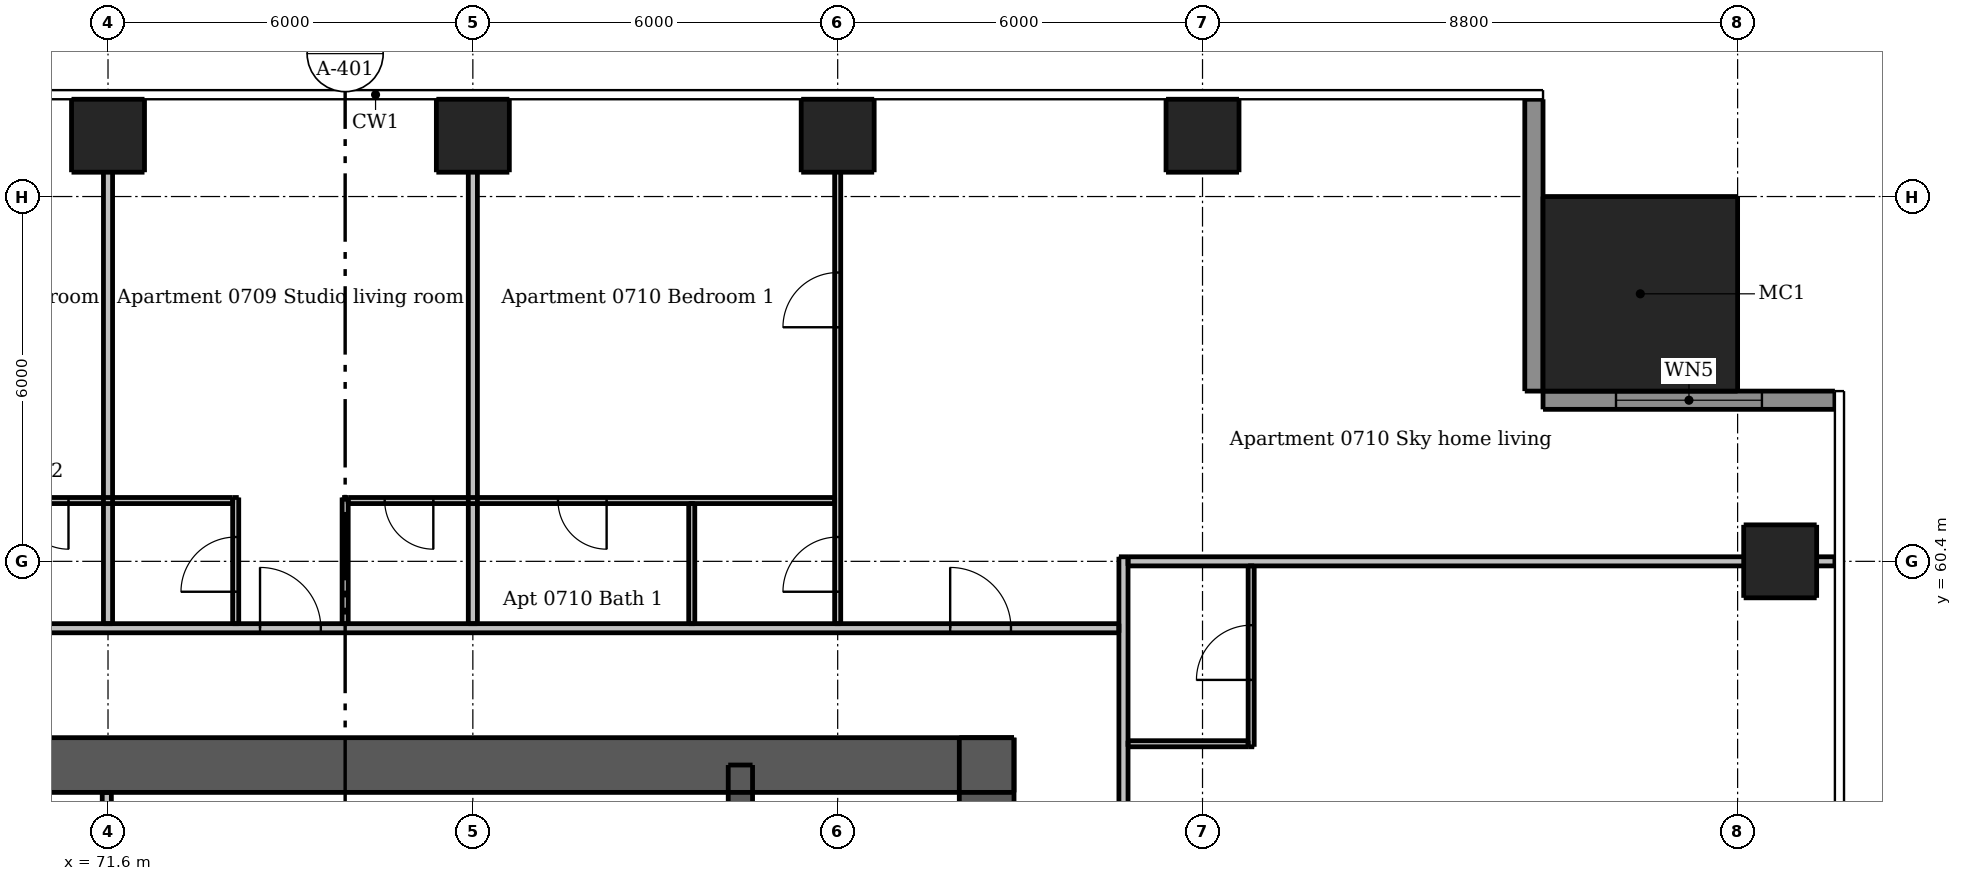
"""IFC4 building model, lengths in metres.
Left out: names, types, materials, properties, quantities, classifications, styles, units other than length and angle.
Written with IfcOpenShell. Run it as: python <this file> out.ifc"""

import sys

from ifc_helpers import new_model, si_unit, direction, frame, frame_2d, origin, origin_2d, place, context, subcontext, project, spatial, rectangle, extrude, element, fill, save


model = new_model("IFC4")
c1 = context("Model", 3, precision=1e-05, world=origin(), true_north=direction((0.0, 1.0)))
c2 = subcontext(c1, "Body", "Model", "MODEL_VIEW")
j1 = project(units=[si_unit("LENGTHUNIT", "METRE"), si_unit("PLANEANGLEUNIT", "RADIAN")], contexts=[c1])
p1 = place(None, origin())
s1 = spatial("IfcSite", under=j1, at=p1, CompositionType="ELEMENT")
p2 = place(p1, origin())
s2 = spatial("IfcBuilding", under=s1, at=p2, CompositionType="ELEMENT")
p3 = place(p2, frame((0.0, 0.0, 30.1)))
s3 = spatial("IfcBuildingStorey", under=s2, at=p3, CompositionType="ELEMENT", Elevation=30.1)
p4 = place(p3, frame((62.5, 57.05, 0.0), z_axis=(0.0, 0.0, 1.0), x_axis=(1.0, 0.0, 0.0)))
e1 = element("IfcWall", 1, at=p4, inside=s3, PredefinedType="SHEAR", context=c2, shape_type="SweptSolid", body=[
    extrude(rectangle(XDim=24.0, YDim=0.9, at=frame_2d((12.0, 0.0))), origin(), (0.0, 0.0, 1.0), 3.05),
])
p5 = place(p4, frame((20.85, 0.0, 0.0)))
e2 = element("IfcOpeningElement", 2, at=p5, cuts=e1, PredefinedType="OPENING", context=c2, shape_type="SweptSolid", body=[
    extrude(rectangle(XDim=1.1, YDim=2.1, at=frame_2d((0.55, 1.05))), frame((0.0, 0.46, 0.0), z_axis=(0.0, -1.0, 0.0), x_axis=(1.0, 0.0, 0.0)), (0.0, 0.0, 1.0), 0.92),
])
p6 = place(p4, frame((2.05, 0.0, 0.0)))
e3 = element("IfcOpeningElement", 3, at=p6, cuts=e1, PredefinedType="OPENING", context=c2, shape_type="SweptSolid", body=[
    extrude(rectangle(XDim=1.1, YDim=2.1, at=frame_2d((0.55, 1.05))), frame((0.0, 0.46, 0.0), z_axis=(0.0, -1.0, 0.0), x_axis=(1.0, 0.0, 0.0)), (0.0, 0.0, 1.0), 0.92),
])
p7 = place(p4, frame((6.44, 0.0, 0.0)))
e4 = element("IfcOpeningElement", 4, at=p7, cuts=e1, PredefinedType="OPENING", context=c2, shape_type="SweptSolid", body=[
    extrude(rectangle(XDim=0.9, YDim=2.1, at=frame_2d((0.45, 1.05))), frame((0.0, 0.46, 0.0), z_axis=(0.0, -1.0, 0.0), x_axis=(1.0, 0.0, 0.0)), (0.0, 0.0, 1.0), 0.92),
])
p8 = place(p4, frame((13.74, 0.0, 0.0)))
e5 = element("IfcOpeningElement", 5, at=p8, cuts=e1, PredefinedType="OPENING", context=c2, shape_type="SweptSolid", body=[
    extrude(rectangle(XDim=0.9, YDim=2.1, at=frame_2d((0.45, 1.05))), frame((0.0, 0.46, 0.0), z_axis=(0.0, -1.0, 0.0), x_axis=(1.0, 0.0, 0.0)), (0.0, 0.0, 1.0), 0.92),
])
p9 = place(p3, frame((86.05, 33.5, 0.0), z_axis=(0.0, 0.0, 1.0), x_axis=(0.0, 1.0, 0.0)))
e6 = element("IfcWall", 6, at=p9, inside=s3, PredefinedType="SHEAR", context=c2, shape_type="SweptSolid", body=[
    extrude(rectangle(XDim=24.0, YDim=0.9, at=frame_2d((12.0, 0.0))), origin(), (0.0, 0.0, 1.0), 3.05),
])
p10 = place(p9, frame((11.2, 0.0, 0.0)))
e7 = element("IfcOpeningElement", 7, at=p10, cuts=e6, PredefinedType="OPENING", context=c2, shape_type="SweptSolid", body=[
    extrude(rectangle(XDim=1.6, YDim=2.1, at=frame_2d((0.8, 1.05))), frame((0.0, 0.46, 0.0), z_axis=(0.0, -1.0, 0.0), x_axis=(1.0, 0.0, 0.0)), (0.0, 0.0, 1.0), 0.92),
])
p11 = place(p3, frame((82.0, 47.1, 0.0), z_axis=(0.0, 0.0, 1.0), x_axis=(0.0, 1.0, 0.0)))
e8 = element("IfcWall", 8, at=p11, inside=s3, PredefinedType="SHEAR", context=c2, shape_type="SweptSolid", body=[
    extrude(rectangle(XDim=9.95, YDim=0.4, at=frame_2d((4.975, 0.0))), origin(), (0.0, 0.0, 1.0), 3.05),
])
for number, where, z_axis, x_axis in (
    (9, (99.1, 60.4, 0.0), (0.0, 0.0, 1.0), (1.0, 0.0, 0.0)),
    (10, (71.6, 67.4, 0.0), (0.0, 0.0, 1.0), (1.0, 0.0, 0.0)),
    (11, (77.6, 67.4, 0.0), (0.0, 0.0, 1.0), (1.0, 0.0, 0.0)),
    (12, (83.6, 67.4, 0.0), (0.0, 0.0, 1.0), (1.0, 0.0, 0.0)),
    (13, (89.6, 67.4, 0.0), (0.0, 0.0, 1.0), (1.0, 0.0, 0.0)),
):
    element("IfcColumn", number, at=place(p3, frame(where, z_axis=z_axis, x_axis=x_axis)), inside=s3, PredefinedType="COLUMN", context=c2, shape_type="SweptSolid", body=[
        extrude(rectangle(XDim=1.2, YDim=1.2, at=origin_2d()), origin(), (0.0, 0.0, 1.0), 3.05),
    ])
p12 = place(p3, frame((96.8, 64.8, 0.0), z_axis=(0.0, 0.0, 1.0), x_axis=(1.0, 0.0, 0.0)))
e14 = element("IfcColumn", 14, at=p12, inside=s3, PredefinedType="COLUMN", context=c2, shape_type="SweptSolid", body=[
    extrude(rectangle(XDim=3.2, YDim=3.2, at=origin_2d()), origin(), (0.0, 0.0, 1.0), 3.3),
])
p13 = place(p3, frame((100.0, 63.05, 0.0), z_axis=(0.0, 0.0, 1.0), x_axis=(-1.0, 0.0, 0.0)))
e15 = element("IfcWall", 15, at=p13, inside=s3, PredefinedType="SOLIDWALL", context=c2, shape_type="SweptSolid", body=[
    extrude(rectangle(XDim=4.8, YDim=0.3, at=frame_2d((2.4, 0.0))), origin(), (0.0, 0.0, 1.0), 3.05),
])
p14 = place(p13, frame((1.2, 0.0, 0.15)))
e16 = element("IfcOpeningElement", 16, at=p14, cuts=e15, PredefinedType="OPENING", context=c2, shape_type="SweptSolid", body=[
    extrude(rectangle(XDim=2.4, YDim=2.1, at=frame_2d((1.2, 1.05))), frame((0.0, 0.16, 0.0), z_axis=(0.0, -1.0, 0.0), x_axis=(1.0, 0.0, 0.0)), (0.0, 0.0, 1.0), 0.32),
])
p15 = place(p3, frame((95.05, 63.2, 0.0), z_axis=(0.0, 0.0, 1.0), x_axis=(0.0, 1.0, 0.0)))
e17 = element("IfcWall", 17, at=p15, inside=s3, PredefinedType="SOLIDWALL", context=c2, shape_type="SweptSolid", body=[
    extrude(rectangle(XDim=4.8, YDim=0.3, at=frame_2d((2.4, 0.0))), origin(), (0.0, 0.0, 1.0), 3.05),
])
p16 = place(p3, frame((71.58, 50.2, 0.0), z_axis=(0.0, 0.0, 1.0), x_axis=(0.0, 1.0, 0.0)))
e18 = element("IfcWall", 18, at=p16, inside=s3, PredefinedType="PLUMBINGWALL", context=c2, shape_type="SweptSolid", body=[
    extrude(rectangle(XDim=6.4, YDim=0.15, at=frame_2d((3.2, 0.0))), origin(), (0.0, 0.0, 1.0), 3.05),
])
p17 = place(p3, frame((73.7, 59.375, 0.0), z_axis=(0.0, 0.0, 1.0), x_axis=(0.0, 1.0, 0.0)))
e19 = element("IfcWall", 19, at=p17, inside=s3, PredefinedType="PARTITIONING", context=c2, shape_type="SweptSolid", body=[
    extrude(rectangle(XDim=2.075, YDim=0.1, at=frame_2d((1.038, 0.0))), origin(), (0.0, 0.0, 1.0), 3.05),
])
p18 = place(p17, frame((0.525, 0.0, 0.0)))
e20 = element("IfcOpeningElement", 20, at=p18, cuts=e19, PredefinedType="OPENING", context=c2, shape_type="SweptSolid", body=[
    extrude(rectangle(XDim=0.9, YDim=2.1, at=frame_2d((0.45, 1.05))), frame((0.0, 0.06, 0.0), z_axis=(0.0, -1.0, 0.0), x_axis=(1.0, 0.0, 0.0)), (0.0, 0.0, 1.0), 0.12),
])
p19 = place(p3, frame((75.5, 59.375, 0.0), z_axis=(0.0, 0.0, 1.0), x_axis=(0.0, 1.0, 0.0)))
e21 = element("IfcWall", 21, at=p19, inside=s3, PredefinedType="PARTITIONING", context=c2, shape_type="SweptSolid", body=[
    extrude(rectangle(XDim=2.075, YDim=0.1, at=frame_2d((1.038, 0.0))), origin(), (0.0, 0.0, 1.0), 3.05),
])
p20 = place(p3, frame((81.2, 59.375, 0.0), z_axis=(0.0, 0.0, 1.0), x_axis=(0.0, 1.0, 0.0)))
e22 = element("IfcWall", 22, at=p20, inside=s3, PredefinedType="PARTITIONING", context=c2, shape_type="SweptSolid", body=[
    extrude(rectangle(XDim=1.975, YDim=0.1, at=frame_2d((0.988, 0.0))), origin(), (0.0, 0.0, 1.0), 3.05),
])
p21 = place(p3, frame((83.6, 59.375, 0.0), z_axis=(0.0, 0.0, 1.0), x_axis=(0.0, 1.0, 0.0)))
e23 = element("IfcWall", 23, at=p21, inside=s3, PredefinedType="PARTITIONING", context=c2, shape_type="SweptSolid", body=[
    extrude(rectangle(XDim=8.625, YDim=0.1, at=frame_2d((4.312, 0.0))), origin(), (0.0, 0.0, 1.0), 2.516),
])
p22 = place(p21, frame((0.525, 0.0, 0.0)))
e24 = element("IfcOpeningElement", 24, at=p22, cuts=e23, PredefinedType="OPENING", context=c2, shape_type="SweptSolid", body=[
    extrude(rectangle(XDim=0.9, YDim=2.1, at=frame_2d((0.45, 1.05))), frame((0.0, 0.06, 0.0), z_axis=(0.0, -1.0, 0.0), x_axis=(1.0, 0.0, 0.0)), (0.0, 0.0, 1.0), 0.12),
])
p23 = place(p21, frame((4.875, 0.0, 0.0)))
e25 = element("IfcOpeningElement", 25, at=p23, cuts=e23, PredefinedType="OPENING", context=c2, shape_type="SweptSolid", body=[
    extrude(rectangle(XDim=0.9, YDim=2.1, at=frame_2d((0.45, 1.05))), frame((0.0, 0.06, 0.0), z_axis=(0.0, -1.0, 0.0), x_axis=(1.0, 0.0, 0.0)), (0.0, 0.0, 1.0), 0.12),
])
p24 = place(p3, frame((90.4, 57.35, 0.0), z_axis=(0.0, 0.0, 1.0), x_axis=(0.0, 1.0, 0.0)))
e26 = element("IfcWall", 26, at=p24, inside=s3, PredefinedType="PARTITIONING", context=c2, shape_type="SweptSolid", body=[
    extrude(rectangle(XDim=2.975, YDim=0.1, at=frame_2d((1.487, 0.0))), origin(), (0.0, 0.0, 1.0), 3.05),
])
p25 = place(p24, frame((1.1, 0.0, 0.0)))
e27 = element("IfcOpeningElement", 27, at=p25, cuts=e26, PredefinedType="OPENING", context=c2, shape_type="SweptSolid", body=[
    extrude(rectangle(XDim=0.9, YDim=2.1, at=frame_2d((0.45, 1.05))), frame((0.0, 0.06, 0.0), z_axis=(0.0, -1.0, 0.0), x_axis=(1.0, 0.0, 0.0)), (0.0, 0.0, 1.0), 0.12),
])
p26 = place(p3, frame((73.65, 61.4, 0.0), z_axis=(0.0, 0.0, 1.0), x_axis=(-1.0, 0.0, 0.0)))
e28 = element("IfcWall", 28, at=p26, inside=s3, PredefinedType="PARTITIONING", context=c2, shape_type="SweptSolid", body=[
    extrude(rectangle(XDim=4.1, YDim=0.1, at=frame_2d((2.05, 0.0))), origin(), (0.0, 0.0, 1.0), 3.05),
])
p27 = place(p26, frame((2.7, 0.0, 0.0)))
e29 = element("IfcOpeningElement", 29, at=p27, cuts=e28, PredefinedType="OPENING", context=c2, shape_type="SweptSolid", body=[
    extrude(rectangle(XDim=0.8, YDim=2.1, at=frame_2d((0.4, 1.05))), frame((0.0, 0.06, 0.0), z_axis=(0.0, -1.0, 0.0), x_axis=(1.0, 0.0, 0.0)), (0.0, 0.0, 1.0), 0.12),
])
p28 = place(p3, frame((83.55, 61.4, 0.0), z_axis=(0.0, 0.0, 1.0), x_axis=(-1.0, 0.0, 0.0)))
e30 = element("IfcWall", 30, at=p28, inside=s3, PredefinedType="PARTITIONING", context=c2, shape_type="SweptSolid", body=[
    extrude(rectangle(XDim=8.0, YDim=0.1, at=frame_2d((4.0, 0.0))), origin(), (0.0, 0.0, 1.0), 3.05),
])
p29 = place(p28, frame((6.6, 0.0, 0.0)))
e31 = element("IfcOpeningElement", 31, at=p29, cuts=e30, PredefinedType="OPENING", context=c2, shape_type="SweptSolid", body=[
    extrude(rectangle(XDim=0.8, YDim=2.1, at=frame_2d((0.4, 1.05))), frame((0.0, 0.06, 0.0), z_axis=(0.0, -1.0, 0.0), x_axis=(1.0, 0.0, 0.0)), (0.0, 0.0, 1.0), 0.12),
])
p30 = place(p28, frame((3.75, 0.0, 0.0)))
e32 = element("IfcOpeningElement", 32, at=p30, cuts=e30, PredefinedType="OPENING", context=c2, shape_type="SweptSolid", body=[
    extrude(rectangle(XDim=0.8, YDim=2.1, at=frame_2d((0.4, 1.05))), frame((0.0, 0.06, 0.0), z_axis=(0.0, -1.0, 0.0), x_axis=(1.0, 0.0, 0.0)), (0.0, 0.0, 1.0), 0.12),
])
p31 = place(p3, frame((88.375, 57.4, 0.0), z_axis=(0.0, 0.0, 1.0), x_axis=(1.0, 0.0, 0.0)))
e33 = element("IfcWall", 33, at=p31, inside=s3, PredefinedType="PARTITIONING", context=c2, shape_type="SweptSolid", body=[
    extrude(rectangle(XDim=1.975, YDim=0.1, at=frame_2d((0.988, 0.0))), origin(), (0.0, 0.0, 1.0), 3.05),
])
for number, where, z_axis, x_axis in (
    (34, (71.6, 59.375, 0.0), (0.0, 0.0, 1.0), (0.0, 1.0, 0.0)),
    (35, (77.6, 59.375, 0.0), (0.0, 0.0, 1.0), (0.0, 1.0, 0.0)),
):
    element("IfcWall", number, at=place(p3, frame(where, z_axis=z_axis, x_axis=x_axis)), inside=s3, PredefinedType="PARTITIONING", context=c2, shape_type="SweptSolid", body=[
        extrude(rectangle(XDim=8.625, YDim=0.15, at=frame_2d((4.312, 0.0))), origin(), (0.0, 0.0, 1.0), 2.516),
    ])
p32 = place(p3, frame((88.3, 60.475, 0.0), z_axis=(0.0, 0.0, 1.0), x_axis=(0.0, -1.0, 0.0)))
e36 = element("IfcWall", 36, at=p32, inside=s3, PredefinedType="PARTITIONING", context=c2, shape_type="SweptSolid", body=[
    extrude(rectangle(XDim=28.7, YDim=0.15, at=frame_2d((14.35, 0.0))), origin(), (0.0, 0.0, 1.0), 3.05),
])
p33 = place(p32, frame((27.425, 0.0, 0.0)))
e37 = element("IfcOpeningElement", 37, at=p33, cuts=e36, PredefinedType="OPENING", context=c2, shape_type="SweptSolid", body=[
    extrude(rectangle(XDim=1.0, YDim=2.1, at=frame_2d((0.5, 1.05))), frame((0.0, 0.085, 0.0), z_axis=(0.0, -1.0, 0.0), x_axis=(1.0, 0.0, 0.0)), (0.0, 0.0, 1.0), 0.17),
])
p34 = place(p32, frame((16.325, 0.0, 0.0)))
e38 = element("IfcOpeningElement", 38, at=p34, cuts=e36, PredefinedType="OPENING", context=c2, shape_type="SweptSolid", body=[
    extrude(rectangle(XDim=1.0, YDim=2.1, at=frame_2d((0.5, 1.05))), frame((0.0, 0.085, 0.0), z_axis=(0.0, -1.0, 0.0), x_axis=(1.0, 0.0, 0.0)), (0.0, 0.0, 1.0), 0.17),
])
p35 = place(p32, frame((5.525, 0.0, 0.0)))
e39 = element("IfcOpeningElement", 39, at=p35, cuts=e36, PredefinedType="OPENING", context=c2, shape_type="SweptSolid", body=[
    extrude(rectangle(XDim=1.0, YDim=2.1, at=frame_2d((0.5, 1.05))), frame((0.0, 0.085, 0.0), z_axis=(0.0, -1.0, 0.0), x_axis=(1.0, 0.0, 0.0)), (0.0, 0.0, 1.0), 0.17),
])
p36 = place(p3, frame((88.375, 60.4, 0.0), z_axis=(0.0, 0.0, 1.0), x_axis=(1.0, 0.0, 0.0)))
e40 = element("IfcWall", 40, at=p36, inside=s3, PredefinedType="PARTITIONING", context=c2, shape_type="SweptSolid", body=[
    extrude(rectangle(XDim=11.625, YDim=0.15, at=frame_2d((5.812, 0.0))), origin(), (0.0, 0.0, 1.0), 2.516),
])
p37 = place(p3, frame((59.675, 59.3, 0.0), z_axis=(0.0, 0.0, 1.0), x_axis=(1.0, 0.0, 0.0)))
e41 = element("IfcWall", 41, at=p37, inside=s3, PredefinedType="PARTITIONING", context=c2, shape_type="SweptSolid", body=[
    extrude(rectangle(XDim=28.55, YDim=0.15, at=frame_2d((14.275, 0.0))), origin(), (0.0, 0.0, 1.0), 3.05),
])
p38 = place(p37, frame((2.425, 0.0, 0.0)))
e42 = element("IfcOpeningElement", 42, at=p38, cuts=e41, PredefinedType="OPENING", context=c2, shape_type="SweptSolid", body=[
    extrude(rectangle(XDim=1.0, YDim=2.1, at=frame_2d((0.5, 1.05))), frame((0.0, 0.085, 0.0), z_axis=(0.0, -1.0, 0.0), x_axis=(1.0, 0.0, 0.0)), (0.0, 0.0, 1.0), 0.17),
])
p39 = place(p37, frame((8.425, 0.0, 0.0)))
e43 = element("IfcOpeningElement", 43, at=p39, cuts=e41, PredefinedType="OPENING", context=c2, shape_type="SweptSolid", body=[
    extrude(rectangle(XDim=1.0, YDim=2.1, at=frame_2d((0.5, 1.05))), frame((0.0, 0.085, 0.0), z_axis=(0.0, -1.0, 0.0), x_axis=(1.0, 0.0, 0.0)), (0.0, 0.0, 1.0), 0.17),
])
p40 = place(p37, frame((14.425, 0.0, 0.0)))
e44 = element("IfcOpeningElement", 44, at=p40, cuts=e41, PredefinedType="OPENING", context=c2, shape_type="SweptSolid", body=[
    extrude(rectangle(XDim=1.0, YDim=2.1, at=frame_2d((0.5, 1.05))), frame((0.0, 0.085, 0.0), z_axis=(0.0, -1.0, 0.0), x_axis=(1.0, 0.0, 0.0)), (0.0, 0.0, 1.0), 0.17),
])
p41 = place(p37, frame((25.775, 0.0, 0.0)))
e45 = element("IfcOpeningElement", 45, at=p41, cuts=e41, PredefinedType="OPENING", context=c2, shape_type="SweptSolid", body=[
    extrude(rectangle(XDim=1.0, YDim=2.1, at=frame_2d((0.5, 1.05))), frame((0.0, 0.085, 0.0), z_axis=(0.0, -1.0, 0.0), x_axis=(1.0, 0.0, 0.0)), (0.0, 0.0, 1.0), 0.17),
])
p42 = place(p14, origin())
e46 = element("IfcWindow", 46, at=p42, inside=s3, PartitioningType="DOUBLE_PANEL_VERTICAL", PredefinedType="WINDOW", context=c2, shape_type="SweptSolid", body=[
    extrude(rectangle(XDim=2.4, YDim=2.1, at=frame_2d((1.2, 1.05))), frame((0.0, 0.03, 0.0), z_axis=(0.0, -1.0, 0.0), x_axis=(1.0, 0.0, 0.0)), (0.0, 0.0, 1.0), 0.06),
])
fill(e16, e46)
p43 = place(p5, origin())
e47 = element("IfcDoor", 47, at=p43, inside=s3, OperationType="SINGLE_SWING_RIGHT", PredefinedType="DOOR", context=c2, shape_type="SweptSolid", body=[
    extrude(rectangle(XDim=1.1, YDim=2.1, at=frame_2d((0.55, 1.05))), frame((0.0, -0.388, 0.0), z_axis=(0.0, -1.0, 0.0), x_axis=(1.0, 0.0, 0.0)), (0.0, 0.0, 1.0), 0.05),
])
fill(e2, e47)
p44 = place(p8, origin())
e48 = element("IfcDoor", 48, at=p44, inside=s3, OperationType="SINGLE_SWING_RIGHT", PredefinedType="DOOR", context=c2, shape_type="SweptSolid", body=[
    extrude(rectangle(XDim=0.9, YDim=2.1, at=frame_2d((0.45, 1.05))), frame((0.0, -0.388, 0.0), z_axis=(0.0, -1.0, 0.0), x_axis=(1.0, 0.0, 0.0)), (0.0, 0.0, 1.0), 0.05),
])
fill(e5, e48)
p45 = place(p25, origin())
e49 = element("IfcDoor", 49, at=p45, inside=s3, OperationType="SINGLE_SWING_LEFT", PredefinedType="DOOR", context=c2, shape_type="SweptSolid", body=[
    extrude(rectangle(XDim=0.9, YDim=2.1, at=frame_2d((0.45, 1.05))), frame((0.0, 0.025, 0.0), z_axis=(0.0, -1.0, 0.0), x_axis=(1.0, 0.0, 0.0)), (0.0, 0.0, 1.0), 0.05),
])
fill(e27, e49)
p46 = place(p27, origin())
e50 = element("IfcDoor", 50, at=p46, inside=s3, OperationType="SINGLE_SWING_LEFT", PredefinedType="DOOR", context=c2, shape_type="SweptSolid", body=[
    extrude(rectangle(XDim=0.8, YDim=2.1, at=frame_2d((0.4, 1.05))), frame((0.0, 0.025, 0.0), z_axis=(0.0, -1.0, 0.0), x_axis=(1.0, 0.0, 0.0)), (0.0, 0.0, 1.0), 0.05),
])
fill(e29, e50)
p47 = place(p40, origin())
e51 = element("IfcDoor", 51, at=p47, inside=s3, OperationType="SINGLE_SWING_LEFT", PredefinedType="DOOR", context=c2, shape_type="SweptSolid", body=[
    extrude(rectangle(XDim=1.0, YDim=2.1, at=frame_2d((0.5, 1.05))), frame((0.0, 0.025, 0.0), z_axis=(0.0, -1.0, 0.0), x_axis=(1.0, 0.0, 0.0)), (0.0, 0.0, 1.0), 0.05),
])
fill(e44, e51)
p48 = place(p18, origin())
e52 = element("IfcDoor", 52, at=p48, inside=s3, OperationType="SINGLE_SWING_LEFT", PredefinedType="DOOR", context=c2, shape_type="SweptSolid", body=[
    extrude(rectangle(XDim=0.9, YDim=2.1, at=frame_2d((0.45, 1.05))), frame((0.0, 0.025, 0.0), z_axis=(0.0, -1.0, 0.0), x_axis=(1.0, 0.0, 0.0)), (0.0, 0.0, 1.0), 0.05),
])
fill(e20, e52)
p49 = place(p29, origin())
e53 = element("IfcDoor", 53, at=p49, inside=s3, OperationType="SINGLE_SWING_LEFT", PredefinedType="DOOR", context=c2, shape_type="SweptSolid", body=[
    extrude(rectangle(XDim=0.8, YDim=2.1, at=frame_2d((0.4, 1.05))), frame((0.0, 0.025, 0.0), z_axis=(0.0, -1.0, 0.0), x_axis=(1.0, 0.0, 0.0)), (0.0, 0.0, 1.0), 0.05),
])
fill(e31, e53)
p50 = place(p41, origin())
e54 = element("IfcDoor", 54, at=p50, inside=s3, OperationType="SINGLE_SWING_LEFT", PredefinedType="DOOR", context=c2, shape_type="SweptSolid", body=[
    extrude(rectangle(XDim=1.0, YDim=2.1, at=frame_2d((0.5, 1.05))), frame((0.0, 0.025, 0.0), z_axis=(0.0, -1.0, 0.0), x_axis=(1.0, 0.0, 0.0)), (0.0, 0.0, 1.0), 0.05),
])
fill(e45, e54)
p51 = place(p22, origin())
e55 = element("IfcDoor", 55, at=p51, inside=s3, OperationType="SINGLE_SWING_LEFT", PredefinedType="DOOR", context=c2, shape_type="SweptSolid", body=[
    extrude(rectangle(XDim=0.9, YDim=2.1, at=frame_2d((0.45, 1.05))), frame((0.0, 0.025, 0.0), z_axis=(0.0, -1.0, 0.0), x_axis=(1.0, 0.0, 0.0)), (0.0, 0.0, 1.0), 0.05),
])
fill(e24, e55)
p52 = place(p23, origin())
e56 = element("IfcDoor", 56, at=p52, inside=s3, OperationType="SINGLE_SWING_LEFT", PredefinedType="DOOR", context=c2, shape_type="SweptSolid", body=[
    extrude(rectangle(XDim=0.9, YDim=2.1, at=frame_2d((0.45, 1.05))), frame((0.0, 0.025, 0.0), z_axis=(0.0, -1.0, 0.0), x_axis=(1.0, 0.0, 0.0)), (0.0, 0.0, 1.0), 0.05),
])
fill(e25, e56)
p53 = place(p30, origin())
e57 = element("IfcDoor", 57, at=p53, inside=s3, OperationType="SINGLE_SWING_LEFT", PredefinedType="DOOR", context=c2, shape_type="SweptSolid", body=[
    extrude(rectangle(XDim=0.8, YDim=2.1, at=frame_2d((0.4, 1.05))), frame((0.0, 0.025, 0.0), z_axis=(0.0, -1.0, 0.0), x_axis=(1.0, 0.0, 0.0)), (0.0, 0.0, 1.0), 0.05),
])
fill(e32, e57)
save(model, sys.argv[1])
